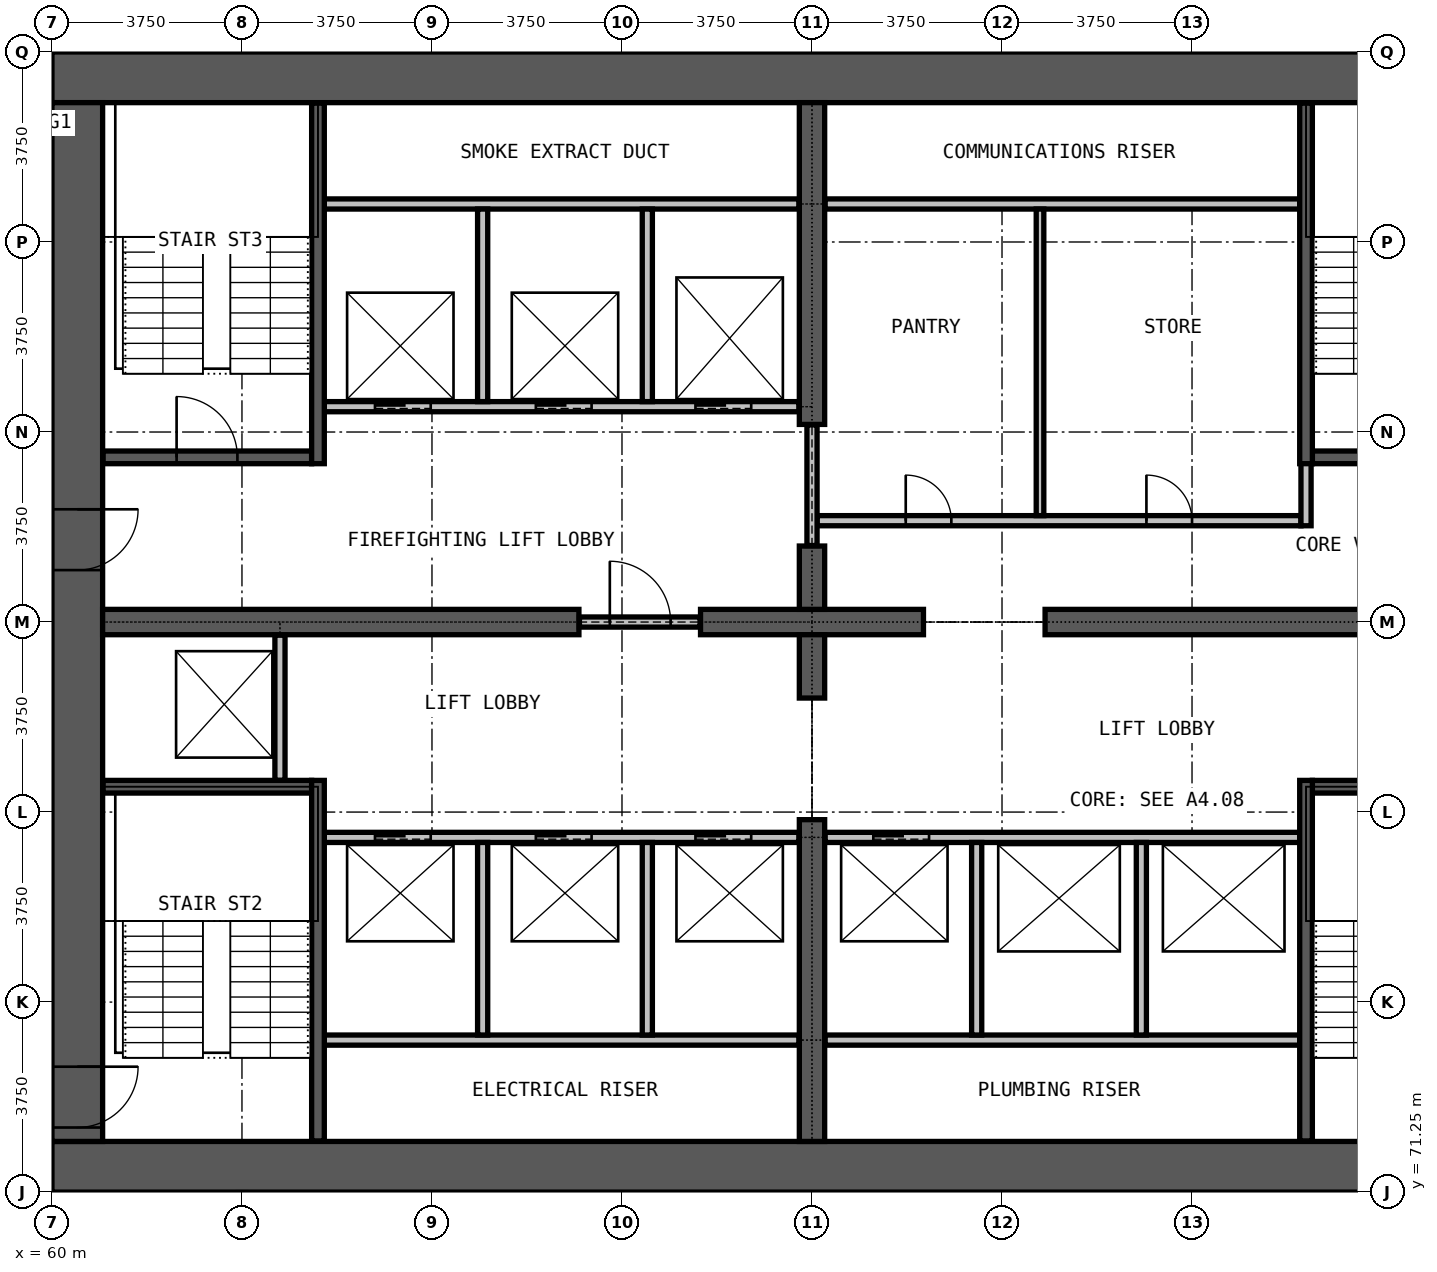
"""IFC4 building model, lengths in metres.
Left out: names, types, materials, properties, quantities, classifications, styles, units other than length and angle.
Written with IfcOpenShell. Run it as: python <this file> out.ifc"""

import sys

from ifc_helpers import new_model, si_unit, direction, frame, frame_2d, origin, place, context, subcontext, project, spatial, rectangle, extrude, element, fill, save


model = new_model("IFC4")
c1 = context("Model", 3, precision=1e-05, world=origin(), true_north=direction((0.0, 1.0)))
c2 = subcontext(c1, "Body", "Model", "MODEL_VIEW")
j1 = project(units=[si_unit("LENGTHUNIT", "METRE"), si_unit("PLANEANGLEUNIT", "RADIAN")], contexts=[c1])
p1 = place(None, origin())
s1 = spatial("IfcSite", under=j1, at=p1, CompositionType="ELEMENT")
p2 = place(p1, origin())
s2 = spatial("IfcBuilding", under=s1, at=p2, CompositionType="ELEMENT")
p3 = place(p2, frame((0.0, 0.0, 46.1)))
s3 = spatial("IfcBuildingStorey", under=s2, at=p3, CompositionType="ELEMENT", Elevation=46.1)
for number, where, z_axis, x_axis in (
    (1, (60.0, 71.75, 0.0), (0.0, 0.0, 1.0), (1.0, 0.0, 0.0)),
    (2, (90.0, 93.25, 0.0), (0.0, 0.0, 1.0), (-1.0, 0.0, 0.0)),
):
    element("IfcWall", number, at=place(p3, frame(where, z_axis=z_axis, x_axis=x_axis)), inside=s3, PredefinedType="SHEAR", context=c2, shape_type="SweptSolid", body=[
        extrude(rectangle(XDim=30.0, YDim=1.0, at=frame_2d((15.0, 0.0))), origin(), (0.0, 0.0, 1.0), 3.3),
    ])
p4 = place(p3, frame((60.5, 92.75, 0.0), z_axis=(0.0, 0.0, 1.0), x_axis=(0.0, -1.0, 0.0)))
e3 = element("IfcWall", 3, at=p4, inside=s3, PredefinedType="SHEAR", context=c2, shape_type="SweptSolid", body=[
    extrude(rectangle(XDim=20.5, YDim=1.0, at=frame_2d((10.25, 0.0))), origin(), (0.0, 0.0, 1.0), 3.3),
])
p5 = place(p4, frame((19.025, 0.0, 0.0)))
e4 = element("IfcOpeningElement", 4, at=p5, cuts=e3, PredefinedType="OPENING", context=c2, shape_type="SweptSolid", body=[
    extrude(rectangle(XDim=1.2, YDim=2.2, at=frame_2d((0.6, 1.1))), frame((0.0, 0.51, 0.0), z_axis=(0.0, -1.0, 0.0), x_axis=(1.0, 0.0, 0.0)), (0.0, 0.0, 1.0), 1.02),
])
p6 = place(p4, frame((8.025, 0.0, 0.0)))
e5 = element("IfcOpeningElement", 5, at=p6, cuts=e3, PredefinedType="OPENING", context=c2, shape_type="SweptSolid", body=[
    extrude(rectangle(XDim=1.2, YDim=2.2, at=frame_2d((0.6, 1.1))), frame((0.0, 0.51, 0.0), z_axis=(0.0, -1.0, 0.0), x_axis=(1.0, 0.0, 0.0)), (0.0, 0.0, 1.0), 1.02),
])
p7 = place(p3, frame((61.0, 82.5, 0.0), z_axis=(0.0, 0.0, 1.0), x_axis=(1.0, 0.0, 0.0)))
e6 = element("IfcWall", 6, at=p7, inside=s3, PredefinedType="SHEAR", context=c2, shape_type="SweptSolid", body=[
    extrude(rectangle(XDim=9.4, YDim=0.5, at=frame_2d((4.7, 0.0))), origin(), (0.0, 0.0, 1.0), 3.3),
])
p8 = place(p3, frame((72.8, 82.5, 0.0), z_axis=(0.0, 0.0, 1.0), x_axis=(1.0, 0.0, 0.0)))
e7 = element("IfcWall", 7, at=p8, inside=s3, PredefinedType="SHEAR", context=c2, shape_type="SweptSolid", body=[
    extrude(rectangle(XDim=4.4, YDim=0.5, at=frame_2d((2.2, 0.0))), origin(), (0.0, 0.0, 1.0), 3.3),
])
p9 = place(p3, frame((79.6, 82.5, 0.0), z_axis=(0.0, 0.0, 1.0), x_axis=(1.0, 0.0, 0.0)))
e8 = element("IfcWall", 8, at=p9, inside=s3, PredefinedType="SHEAR", context=c2, shape_type="SweptSolid", body=[
    extrude(rectangle(XDim=9.4, YDim=0.5, at=frame_2d((4.7, 0.0))), origin(), (0.0, 0.0, 1.0), 3.3),
])
p10 = place(p3, frame((75.0, 72.25, 0.0), z_axis=(0.0, 0.0, 1.0), x_axis=(0.0, 1.0, 0.0)))
e9 = element("IfcWall", 9, at=p10, inside=s3, PredefinedType="SHEAR", context=c2, shape_type="SweptSolid", body=[
    extrude(rectangle(XDim=6.35, YDim=0.5, at=frame_2d((3.175, 0.0))), origin(), (0.0, 0.0, 1.0), 3.3),
])
for number, where, z_axis, x_axis in (
    (10, (75.0, 81.0, 0.0), (0.0, 0.0, 1.0), (0.0, 1.0, 0.0)),
    (11, (75.0, 82.75, 0.0), (0.0, 0.0, 1.0), (0.0, 1.0, 0.0)),
):
    element("IfcWall", number, at=place(p3, frame(where, z_axis=z_axis, x_axis=x_axis)), inside=s3, PredefinedType="SHEAR", context=c2, shape_type="SweptSolid", body=[
        extrude(rectangle(XDim=1.25, YDim=0.5, at=frame_2d((0.625, 0.0))), origin(), (0.0, 0.0, 1.0), 3.3),
    ])
p11 = place(p3, frame((75.0, 86.4, 0.0), z_axis=(0.0, 0.0, 1.0), x_axis=(0.0, 1.0, 0.0)))
e12 = element("IfcWall", 12, at=p11, inside=s3, PredefinedType="SHEAR", context=c2, shape_type="SweptSolid", body=[
    extrude(rectangle(XDim=6.35, YDim=0.5, at=frame_2d((3.175, 0.0))), origin(), (0.0, 0.0, 1.0), 3.3),
])
p12 = place(p3, frame((70.41, 82.5, 0.0), z_axis=(0.0, 0.0, 1.0), x_axis=(1.0, 0.0, 0.0)))
e13 = element("IfcWall", 13, at=p12, inside=s3, PredefinedType="PARTITIONING", context=c2, shape_type="SweptSolid", body=[
    extrude(rectangle(XDim=2.38, YDim=0.2, at=frame_2d((1.19, 0.0))), origin(), (0.0, 0.0, 1.0), 2.4),
])
p13 = place(p12, frame((0.6, 0.0, 0.0)))
e14 = element("IfcOpeningElement", 14, at=p13, cuts=e13, PredefinedType="OPENING", context=c2, shape_type="SweptSolid", body=[
    extrude(rectangle(XDim=1.2, YDim=2.2, at=frame_2d((0.6, 1.1))), frame((0.0, 0.11, 0.0), z_axis=(0.0, -1.0, 0.0), x_axis=(1.0, 0.0, 0.0)), (0.0, 0.0, 1.0), 0.22),
])
p14 = place(p3, frame((75.1, 84.5, 0.0), z_axis=(0.0, 0.0, 1.0), x_axis=(1.0, 0.0, 0.0)))
e15 = element("IfcWall", 15, at=p14, inside=s3, PredefinedType="PARTITIONING", context=c2, shape_type="SweptSolid", body=[
    extrude(rectangle(XDim=9.55, YDim=0.2, at=frame_2d((4.775, 0.0))), origin(), (0.0, 0.0, 1.0), 3.0),
])
p15 = place(p14, frame((1.75, 0.0, 0.0)))
e16 = element("IfcOpeningElement", 16, at=p15, cuts=e15, PredefinedType="OPENING", context=c2, shape_type="SweptSolid", body=[
    extrude(rectangle(XDim=0.9, YDim=2.2, at=frame_2d((0.45, 1.1))), frame((0.0, 0.11, 0.0), z_axis=(0.0, -1.0, 0.0), x_axis=(1.0, 0.0, 0.0)), (0.0, 0.0, 1.0), 0.22),
])
p16 = place(p14, frame((6.5, 0.0, 0.0)))
e17 = element("IfcOpeningElement", 17, at=p16, cuts=e15, PredefinedType="OPENING", context=c2, shape_type="SweptSolid", body=[
    extrude(rectangle(XDim=0.9, YDim=2.2, at=frame_2d((0.45, 1.1))), frame((0.0, 0.11, 0.0), z_axis=(0.0, -1.0, 0.0), x_axis=(1.0, 0.0, 0.0)), (0.0, 0.0, 1.0), 0.22),
])
p17 = place(p3, frame((75.26, 90.75, 0.0), z_axis=(0.0, 0.0, 1.0), x_axis=(1.0, 0.0, 0.0)))
e18 = element("IfcWall", 18, at=p17, inside=s3, PredefinedType="PARTITIONING", context=c2, shape_type="SweptSolid", body=[
    extrude(rectangle(XDim=9.365, YDim=0.2, at=frame_2d((4.683, 0.0))), origin(), (0.0, 0.0, 1.0), 3.0),
])
p18 = place(p3, frame((75.0, 84.01, 0.0), z_axis=(0.0, 0.0, 1.0), x_axis=(0.0, 1.0, 0.0)))
e19 = element("IfcWall", 19, at=p18, inside=s3, PredefinedType="PARTITIONING", context=c2, shape_type="SweptSolid", body=[
    extrude(rectangle(XDim=2.38, YDim=0.2, at=frame_2d((1.19, 0.0))), origin(), (0.0, 0.0, 1.0), 2.4),
])
p19 = place(p3, frame((84.75, 84.4, 0.0), z_axis=(0.0, 0.0, 1.0), x_axis=(0.0, 1.0, 0.0)))
e20 = element("IfcWall", 20, at=p19, inside=s3, PredefinedType="PARTITIONING", context=c2, shape_type="SweptSolid", body=[
    extrude(rectangle(XDim=1.475, YDim=0.2, at=frame_2d((0.738, 0.0))), origin(), (0.0, 0.0, 1.0), 3.0),
])
p20 = place(p3, frame((79.5, 84.6, 0.0), z_axis=(0.0, 0.0, 1.0), x_axis=(0.0, 1.0, 0.0)))
e21 = element("IfcWall", 21, at=p20, inside=s3, PredefinedType="PARTITIONING", context=c2, shape_type="SweptSolid", body=[
    extrude(rectangle(XDim=6.05, YDim=0.15, at=frame_2d((3.025, 0.0))), origin(), (0.0, 0.0, 1.0), 3.0),
])
for number, where, z_axis, x_axis in (
    (22, (65.375, 74.25, 0.0), (0.0, 0.0, 1.0), (1.0, 0.0, 0.0)),
    (23, (75.26, 74.25, 0.0), (0.0, 0.0, 1.0), (1.0, 0.0, 0.0)),
):
    element("IfcWall", number, at=place(p3, frame(where, z_axis=z_axis, x_axis=x_axis)), inside=s3, PredefinedType="PARTITIONING", context=c2, shape_type="SweptSolid", body=[
        extrude(rectangle(XDim=9.365, YDim=0.2, at=frame_2d((4.683, 0.0))), origin(), (0.0, 0.0, 1.0), 3.0),
    ])
p21 = place(p3, frame((65.375, 78.25, 0.0), z_axis=(0.0, 0.0, 1.0), x_axis=(1.0, 0.0, 0.0)))
e24 = element("IfcWall", 24, at=p21, inside=s3, PredefinedType="PARTITIONING", context=c2, shape_type="SweptSolid", body=[
    extrude(rectangle(XDim=9.365, YDim=0.2, at=frame_2d((4.683, 0.0))), origin(), (0.0, 0.0, 1.0), 3.0),
])
p22 = place(p21, frame((1.0, 0.0, 0.0)))
e25 = element("IfcOpeningElement", 25, at=p22, cuts=e24, PredefinedType="OPENING", context=c2, shape_type="SweptSolid", body=[
    extrude(rectangle(XDim=1.1, YDim=2.2, at=frame_2d((0.55, 1.1))), frame((0.0, 0.11, 0.0), z_axis=(0.0, -1.0, 0.0), x_axis=(1.0, 0.0, 0.0)), (0.0, 0.0, 1.0), 0.22),
])
p23 = place(p21, frame((4.175, 0.0, 0.0)))
e26 = element("IfcOpeningElement", 26, at=p23, cuts=e24, PredefinedType="OPENING", context=c2, shape_type="SweptSolid", body=[
    extrude(rectangle(XDim=1.1, YDim=2.2, at=frame_2d((0.55, 1.1))), frame((0.0, 0.11, 0.0), z_axis=(0.0, -1.0, 0.0), x_axis=(1.0, 0.0, 0.0)), (0.0, 0.0, 1.0), 0.22),
])
p24 = place(p21, frame((7.325, 0.0, 0.0)))
e27 = element("IfcOpeningElement", 27, at=p24, cuts=e24, PredefinedType="OPENING", context=c2, shape_type="SweptSolid", body=[
    extrude(rectangle(XDim=1.1, YDim=2.2, at=frame_2d((0.55, 1.1))), frame((0.0, 0.11, 0.0), z_axis=(0.0, -1.0, 0.0), x_axis=(1.0, 0.0, 0.0)), (0.0, 0.0, 1.0), 0.22),
])
p25 = place(p3, frame((75.26, 78.25, 0.0), z_axis=(0.0, 0.0, 1.0), x_axis=(1.0, 0.0, 0.0)))
e28 = element("IfcWall", 28, at=p25, inside=s3, PredefinedType="PARTITIONING", context=c2, shape_type="SweptSolid", body=[
    extrude(rectangle(XDim=9.365, YDim=0.2, at=frame_2d((4.683, 0.0))), origin(), (0.0, 0.0, 1.0), 3.0),
])
p26 = place(p25, frame((0.95, 0.0, 0.0)))
e29 = element("IfcOpeningElement", 29, at=p26, cuts=e28, PredefinedType="OPENING", context=c2, shape_type="SweptSolid", body=[
    extrude(rectangle(XDim=1.1, YDim=2.2, at=frame_2d((0.55, 1.1))), frame((0.0, 0.11, 0.0), z_axis=(0.0, -1.0, 0.0), x_axis=(1.0, 0.0, 0.0)), (0.0, 0.0, 1.0), 0.22),
])
p27 = place(p3, frame((65.375, 86.75, 0.0), z_axis=(0.0, 0.0, 1.0), x_axis=(1.0, 0.0, 0.0)))
e30 = element("IfcWall", 30, at=p27, inside=s3, PredefinedType="PARTITIONING", context=c2, shape_type="SweptSolid", body=[
    extrude(rectangle(XDim=9.365, YDim=0.2, at=frame_2d((4.683, 0.0))), origin(), (0.0, 0.0, 1.0), 3.0),
])
p28 = place(p27, frame((1.0, 0.0, 0.0)))
e31 = element("IfcOpeningElement", 31, at=p28, cuts=e30, PredefinedType="OPENING", context=c2, shape_type="SweptSolid", body=[
    extrude(rectangle(XDim=1.1, YDim=2.2, at=frame_2d((0.55, 1.1))), frame((0.0, 0.11, 0.0), z_axis=(0.0, -1.0, 0.0), x_axis=(1.0, 0.0, 0.0)), (0.0, 0.0, 1.0), 0.22),
])
p29 = place(p27, frame((4.175, 0.0, 0.0)))
e32 = element("IfcOpeningElement", 32, at=p29, cuts=e30, PredefinedType="OPENING", context=c2, shape_type="SweptSolid", body=[
    extrude(rectangle(XDim=1.1, YDim=2.2, at=frame_2d((0.55, 1.1))), frame((0.0, 0.11, 0.0), z_axis=(0.0, -1.0, 0.0), x_axis=(1.0, 0.0, 0.0)), (0.0, 0.0, 1.0), 0.22),
])
p30 = place(p27, frame((7.325, 0.0, 0.0)))
e33 = element("IfcOpeningElement", 33, at=p30, cuts=e30, PredefinedType="OPENING", context=c2, shape_type="SweptSolid", body=[
    extrude(rectangle(XDim=1.1, YDim=2.2, at=frame_2d((0.55, 1.1))), frame((0.0, 0.11, 0.0), z_axis=(0.0, -1.0, 0.0), x_axis=(1.0, 0.0, 0.0)), (0.0, 0.0, 1.0), 0.22),
])
p31 = place(p3, frame((65.375, 90.75, 0.0), z_axis=(0.0, 0.0, 1.0), x_axis=(1.0, 0.0, 0.0)))
e34 = element("IfcWall", 34, at=p31, inside=s3, PredefinedType="PARTITIONING", context=c2, shape_type="SweptSolid", body=[
    extrude(rectangle(XDim=9.365, YDim=0.2, at=frame_2d((4.683, 0.0))), origin(), (0.0, 0.0, 1.0), 3.0),
])
p32 = place(p3, frame((64.5, 79.375, 0.0), z_axis=(0.0, 0.0, 1.0), x_axis=(0.0, 1.0, 0.0)))
e35 = element("IfcWall", 35, at=p32, inside=s3, PredefinedType="PARTITIONING", context=c2, shape_type="SweptSolid", body=[
    extrude(rectangle(XDim=2.865, YDim=0.2, at=frame_2d((1.433, 0.0))), origin(), (0.0, 0.0, 1.0), 3.0),
])
for number, where, z_axis, x_axis in (
    (36, (68.5, 74.35, 0.0), (0.0, 0.0, 1.0), (0.0, 1.0, 0.0)),
    (37, (68.5, 86.85, 0.0), (0.0, 0.0, 1.0), (0.0, 1.0, 0.0)),
    (38, (71.75, 74.35, 0.0), (0.0, 0.0, 1.0), (0.0, 1.0, 0.0)),
    (39, (71.75, 86.85, 0.0), (0.0, 0.0, 1.0), (0.0, 1.0, 0.0)),
    (40, (78.25, 74.35, 0.0), (0.0, 0.0, 1.0), (0.0, 1.0, 0.0)),
    (41, (81.5, 74.35, 0.0), (0.0, 0.0, 1.0), (0.0, 1.0, 0.0)),
):
    element("IfcWall", number, at=place(p3, frame(where, z_axis=z_axis, x_axis=x_axis)), inside=s3, PredefinedType="PARTITIONING", context=c2, shape_type="SweptSolid", body=[
        extrude(rectangle(XDim=3.8, YDim=0.2, at=frame_2d((1.9, 0.0))), origin(), (0.0, 0.0, 1.0), 3.0),
    ])
for number, where, z_axis, x_axis in (
    (42, (61.01, 79.25, 0.0), (0.0, 0.0, 1.0), (1.0, 0.0, 0.0)),
    (43, (84.875, 79.25, 0.0), (0.0, 0.0, 1.0), (1.0, 0.0, 0.0)),
):
    element("IfcWall", number, at=place(p3, frame(where, z_axis=z_axis, x_axis=x_axis)), inside=s3, PredefinedType="PARTITIONING", context=c2, shape_type="SweptSolid", body=[
        extrude(rectangle(XDim=4.115, YDim=0.25, at=frame_2d((2.058, 0.0))), origin(), (0.0, 0.0, 1.0), 3.0),
    ])
p33 = place(p3, frame((61.01, 85.75, 0.0), z_axis=(0.0, 0.0, 1.0), x_axis=(1.0, 0.0, 0.0)))
e44 = element("IfcWall", 44, at=p33, inside=s3, PredefinedType="PARTITIONING", context=c2, shape_type="SweptSolid", body=[
    extrude(rectangle(XDim=4.115, YDim=0.25, at=frame_2d((2.058, 0.0))), origin(), (0.0, 0.0, 1.0), 3.0),
])
p34 = place(p33, frame((1.45, 0.0, 0.0)))
e45 = element("IfcOpeningElement", 45, at=p34, cuts=e44, PredefinedType="OPENING", context=c2, shape_type="SweptSolid", body=[
    extrude(rectangle(XDim=1.2, YDim=2.2, at=frame_2d((0.6, 1.1))), frame((0.0, 0.135, 0.0), z_axis=(0.0, -1.0, 0.0), x_axis=(1.0, 0.0, 0.0)), (0.0, 0.0, 1.0), 0.27),
])
p35 = place(p3, frame((84.875, 85.75, 0.0), z_axis=(0.0, 0.0, 1.0), x_axis=(1.0, 0.0, 0.0)))
e46 = element("IfcWall", 46, at=p35, inside=s3, PredefinedType="PARTITIONING", context=c2, shape_type="SweptSolid", body=[
    extrude(rectangle(XDim=4.115, YDim=0.25, at=frame_2d((2.058, 0.0))), origin(), (0.0, 0.0, 1.0), 3.0),
])
for number, where, z_axis, x_axis in (
    (47, (65.25, 72.26, 0.0), (0.0, 0.0, 1.0), (0.0, 1.0, 0.0)),
    (48, (65.25, 85.625, 0.0), (0.0, 0.0, 1.0), (0.0, 1.0, 0.0)),
    (49, (84.75, 72.26, 0.0), (0.0, 0.0, 1.0), (0.0, 1.0, 0.0)),
    (50, (84.75, 85.625, 0.0), (0.0, 0.0, 1.0), (0.0, 1.0, 0.0)),
):
    element("IfcWall", number, at=place(p3, frame(where, z_axis=z_axis, x_axis=x_axis)), inside=s3, PredefinedType="PARTITIONING", context=c2, shape_type="SweptSolid", body=[
        extrude(rectangle(XDim=7.115, YDim=0.25, at=frame_2d((3.558, 0.0))), origin(), (0.0, 0.0, 1.0), 3.0),
    ])
p36 = place(p22, origin())
e51 = element("IfcDoor", 51, at=p36, inside=s3, OperationType="DOUBLE_DOOR_SLIDING", PredefinedType="DOOR", context=c2, shape_type="SweptSolid", body=[
    extrude(rectangle(XDim=1.1, YDim=2.2, at=frame_2d((0.55, 1.1))), frame((0.0, 0.025, 0.0), z_axis=(0.0, -1.0, 0.0), x_axis=(1.0, 0.0, 0.0)), (0.0, 0.0, 1.0), 0.05),
])
fill(e25, e51)
p37 = place(p23, origin())
e52 = element("IfcDoor", 52, at=p37, inside=s3, OperationType="DOUBLE_DOOR_SLIDING", PredefinedType="DOOR", context=c2, shape_type="SweptSolid", body=[
    extrude(rectangle(XDim=1.1, YDim=2.2, at=frame_2d((0.55, 1.1))), frame((0.0, 0.025, 0.0), z_axis=(0.0, -1.0, 0.0), x_axis=(1.0, 0.0, 0.0)), (0.0, 0.0, 1.0), 0.05),
])
fill(e26, e52)
p38 = place(p24, origin())
e53 = element("IfcDoor", 53, at=p38, inside=s3, OperationType="DOUBLE_DOOR_SLIDING", PredefinedType="DOOR", context=c2, shape_type="SweptSolid", body=[
    extrude(rectangle(XDim=1.1, YDim=2.2, at=frame_2d((0.55, 1.1))), frame((0.0, 0.025, 0.0), z_axis=(0.0, -1.0, 0.0), x_axis=(1.0, 0.0, 0.0)), (0.0, 0.0, 1.0), 0.05),
])
fill(e27, e53)
p39 = place(p26, origin())
e54 = element("IfcDoor", 54, at=p39, inside=s3, OperationType="DOUBLE_DOOR_SLIDING", PredefinedType="DOOR", context=c2, shape_type="SweptSolid", body=[
    extrude(rectangle(XDim=1.1, YDim=2.2, at=frame_2d((0.55, 1.1))), frame((0.0, 0.025, 0.0), z_axis=(0.0, -1.0, 0.0), x_axis=(1.0, 0.0, 0.0)), (0.0, 0.0, 1.0), 0.05),
])
fill(e29, e54)
p40 = place(p28, origin())
e55 = element("IfcDoor", 55, at=p40, inside=s3, OperationType="DOUBLE_DOOR_SLIDING", PredefinedType="DOOR", context=c2, shape_type="SweptSolid", body=[
    extrude(rectangle(XDim=1.1, YDim=2.2, at=frame_2d((0.55, 1.1))), frame((0.0, 0.025, 0.0), z_axis=(0.0, -1.0, 0.0), x_axis=(1.0, 0.0, 0.0)), (0.0, 0.0, 1.0), 0.05),
])
fill(e31, e55)
p41 = place(p29, origin())
e56 = element("IfcDoor", 56, at=p41, inside=s3, OperationType="DOUBLE_DOOR_SLIDING", PredefinedType="DOOR", context=c2, shape_type="SweptSolid", body=[
    extrude(rectangle(XDim=1.1, YDim=2.2, at=frame_2d((0.55, 1.1))), frame((0.0, 0.025, 0.0), z_axis=(0.0, -1.0, 0.0), x_axis=(1.0, 0.0, 0.0)), (0.0, 0.0, 1.0), 0.05),
])
fill(e32, e56)
p42 = place(p30, origin())
e57 = element("IfcDoor", 57, at=p42, inside=s3, OperationType="DOUBLE_DOOR_SLIDING", PredefinedType="DOOR", context=c2, shape_type="SweptSolid", body=[
    extrude(rectangle(XDim=1.1, YDim=2.2, at=frame_2d((0.55, 1.1))), frame((0.0, 0.025, 0.0), z_axis=(0.0, -1.0, 0.0), x_axis=(1.0, 0.0, 0.0)), (0.0, 0.0, 1.0), 0.05),
])
fill(e33, e57)
p43 = place(p13, origin())
e58 = element("IfcDoor", 58, at=p43, inside=s3, OperationType="SINGLE_SWING_LEFT", PredefinedType="DOOR", context=c2, shape_type="SweptSolid", body=[
    extrude(rectangle(XDim=1.2, YDim=2.2, at=frame_2d((0.6, 1.1))), frame((0.0, 0.025, 0.0), z_axis=(0.0, -1.0, 0.0), x_axis=(1.0, 0.0, 0.0)), (0.0, 0.0, 1.0), 0.05),
])
fill(e14, e58)
p44 = place(p34, origin())
e59 = element("IfcDoor", 59, at=p44, inside=s3, OperationType="SINGLE_SWING_LEFT", PredefinedType="DOOR", context=c2, shape_type="SweptSolid", body=[
    extrude(rectangle(XDim=1.2, YDim=2.2, at=frame_2d((0.6, 1.1))), frame((0.0, 0.025, 0.0), z_axis=(0.0, -1.0, 0.0), x_axis=(1.0, 0.0, 0.0)), (0.0, 0.0, 1.0), 0.05),
])
fill(e45, e59)
p45 = place(p5, origin())
e60 = element("IfcDoor", 60, at=p45, inside=s3, OperationType="SINGLE_SWING_LEFT", PredefinedType="DOOR", context=c2, shape_type="SweptSolid", body=[
    extrude(rectangle(XDim=1.2, YDim=2.2, at=frame_2d((0.6, 1.1))), frame((0.0, 0.025, 0.0), z_axis=(0.0, -1.0, 0.0), x_axis=(1.0, 0.0, 0.0)), (0.0, 0.0, 1.0), 0.05),
])
fill(e4, e60)
p46 = place(p6, origin())
e61 = element("IfcDoor", 61, at=p46, inside=s3, OperationType="SINGLE_SWING_RIGHT", PredefinedType="DOOR", context=c2, shape_type="SweptSolid", body=[
    extrude(rectangle(XDim=1.2, YDim=2.2, at=frame_2d((0.6, 1.1))), frame((0.0, 0.025, 0.0), z_axis=(0.0, -1.0, 0.0), x_axis=(1.0, 0.0, 0.0)), (0.0, 0.0, 1.0), 0.05),
])
fill(e5, e61)
p47 = place(p15, origin())
e62 = element("IfcDoor", 62, at=p47, inside=s3, OperationType="SINGLE_SWING_LEFT", PredefinedType="DOOR", context=c2, shape_type="SweptSolid", body=[
    extrude(rectangle(XDim=0.9, YDim=2.2, at=frame_2d((0.45, 1.1))), frame((0.0, 0.025, 0.0), z_axis=(0.0, -1.0, 0.0), x_axis=(1.0, 0.0, 0.0)), (0.0, 0.0, 1.0), 0.05),
])
fill(e16, e62)
p48 = place(p16, origin())
e63 = element("IfcDoor", 63, at=p48, inside=s3, OperationType="SINGLE_SWING_RIGHT", PredefinedType="DOOR", context=c2, shape_type="SweptSolid", body=[
    extrude(rectangle(XDim=0.9, YDim=2.2, at=frame_2d((0.45, 1.1))), frame((0.0, 0.025, 0.0), z_axis=(0.0, -1.0, 0.0), x_axis=(1.0, 0.0, 0.0)), (0.0, 0.0, 1.0), 0.05),
])
fill(e17, e63)
save(model, sys.argv[1])
